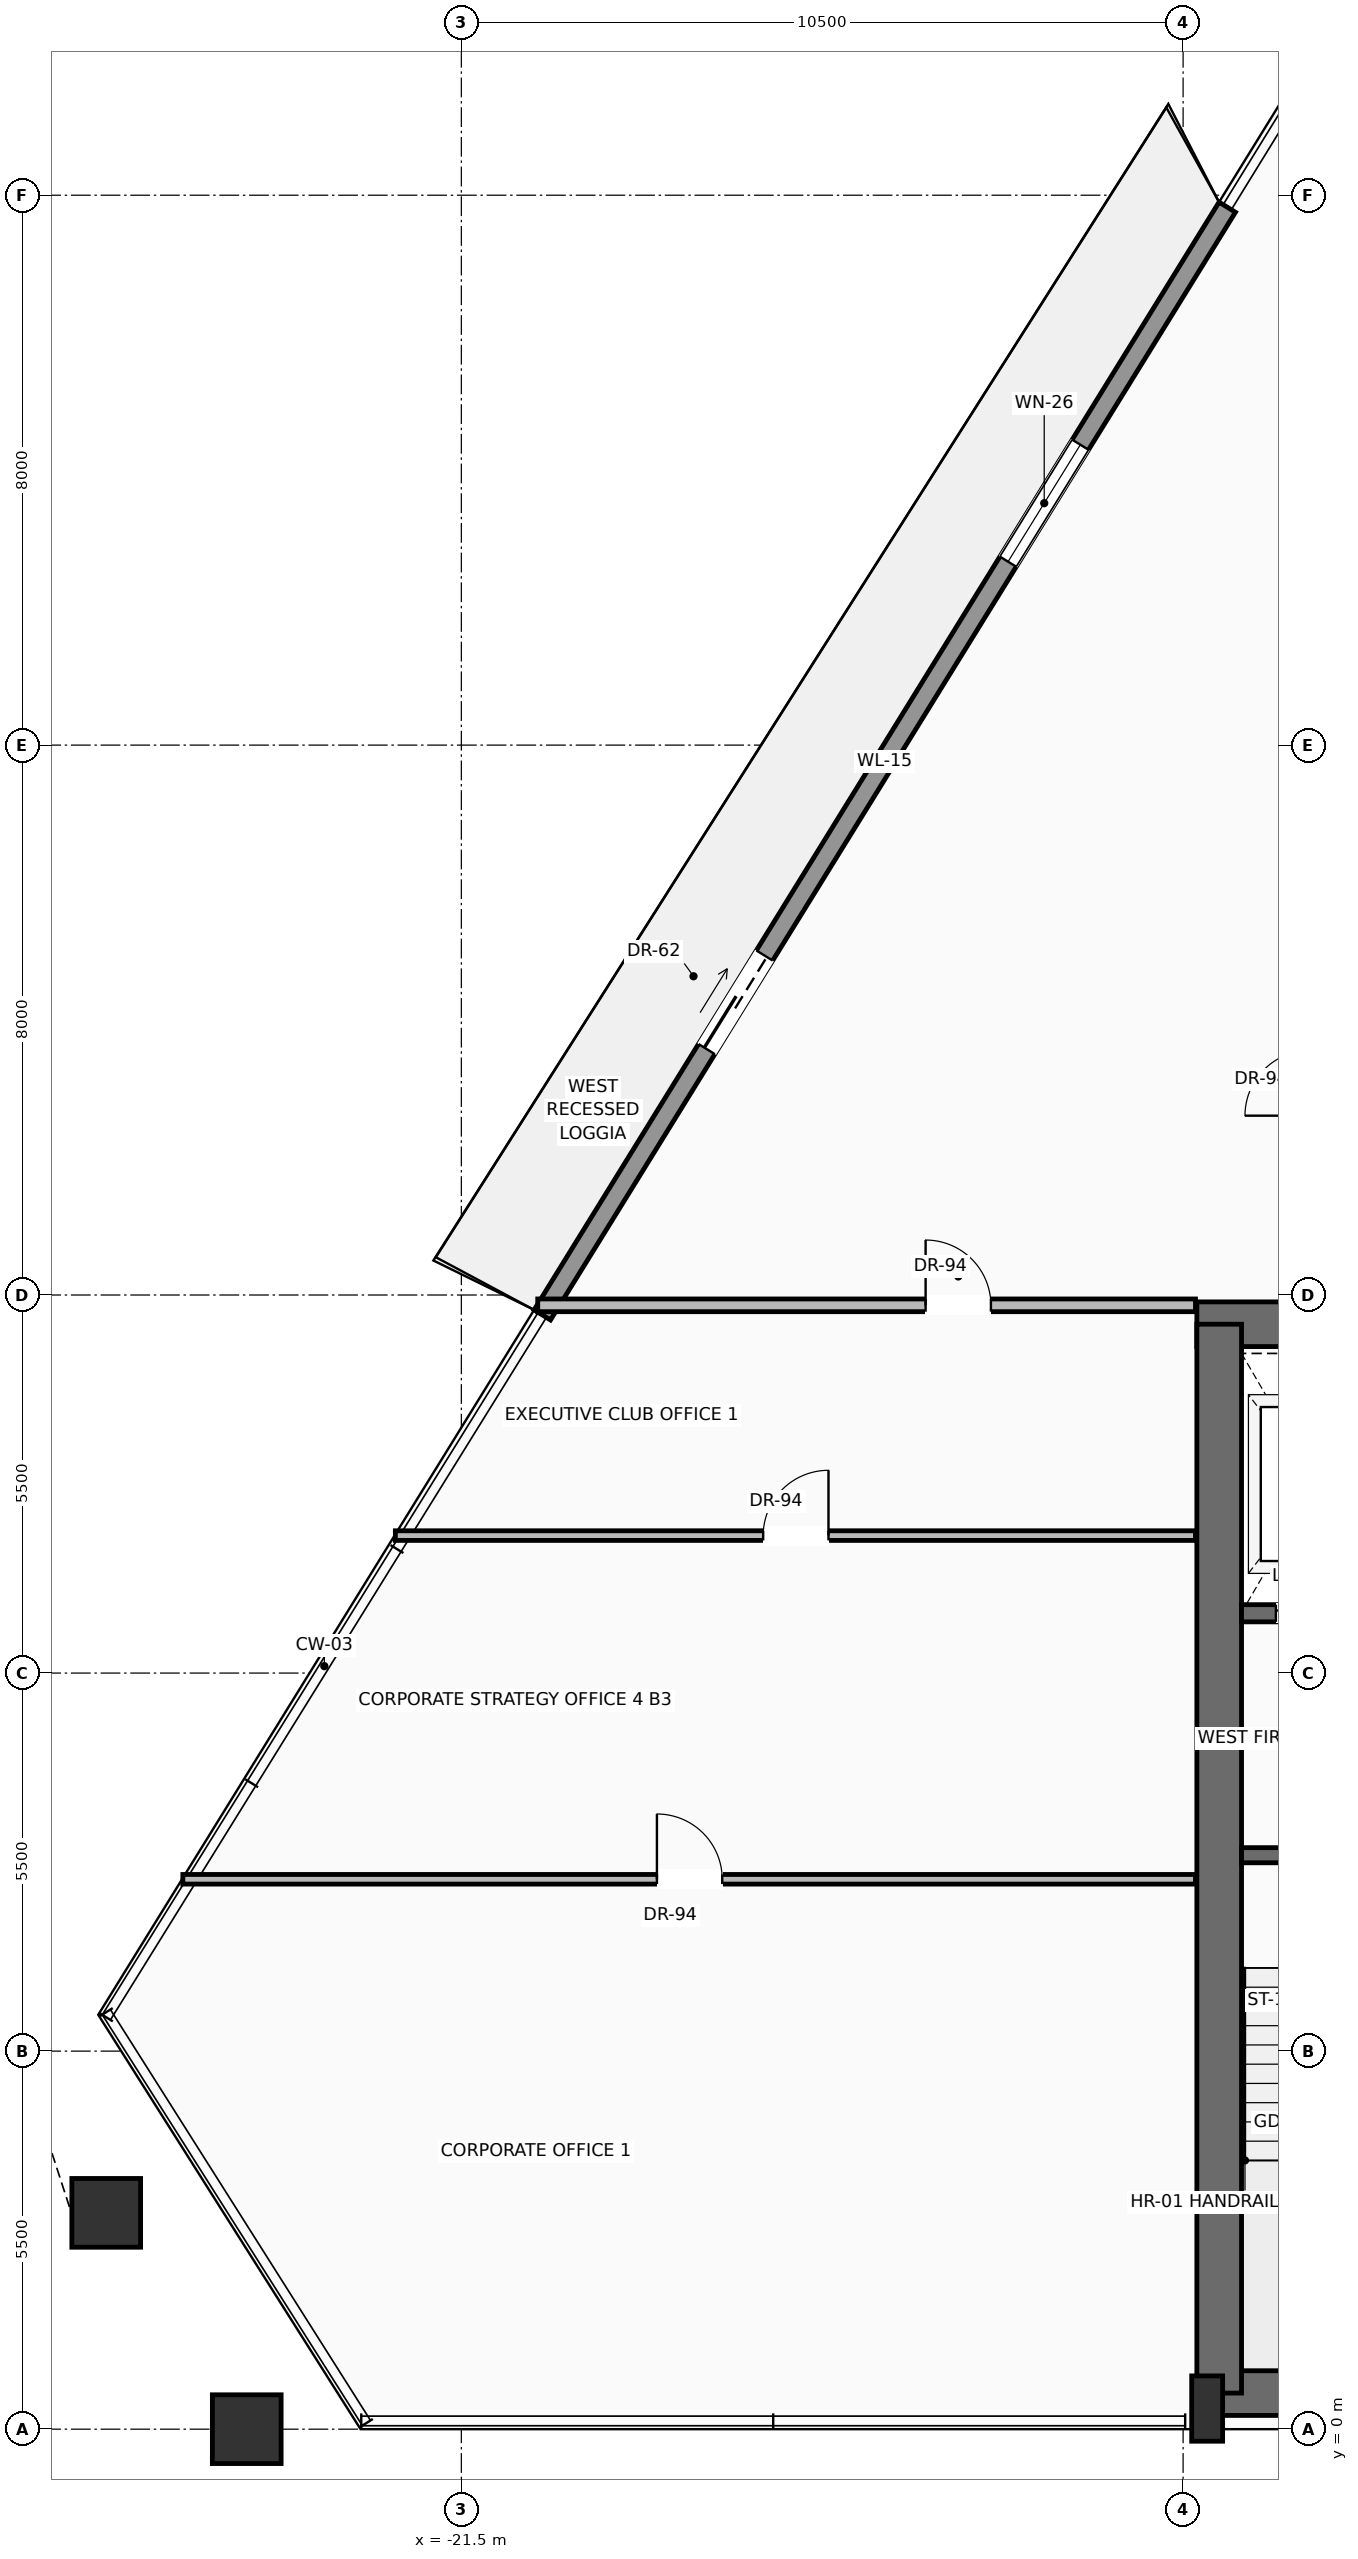
"""IFC4 building model, lengths in metres.
Left out: names, types, materials, properties, quantities, classifications, styles, units other than length and angle.
Written with IfcOpenShell. Run it as: python <this file> out.ifc"""

import sys

from ifc_helpers import new_model, si_unit, direction, frame, frame_2d, origin, origin_2d, place, context, subcontext, project, spatial, rectangle, hollow_rectangle, extrude, source, transform, mapped, element, fill, save


model = new_model("IFC4")
c1 = context("Model", 3, precision=1e-05, world=origin(), true_north=direction((0.0, 1.0)))
c2 = subcontext(c1, "Body", "Model", "MODEL_VIEW")
j1 = project(units=[si_unit("LENGTHUNIT", "METRE"), si_unit("PLANEANGLEUNIT", "RADIAN")], contexts=[c1])
p1 = place(None, origin())
s1 = spatial("IfcSite", under=j1, at=p1, CompositionType="ELEMENT")
p2 = place(p1, origin())
s2 = spatial("IfcBuilding", under=s1, at=p2, CompositionType="ELEMENT")
p3 = place(p2, frame((0.0, 0.0, 189.5)))
s3 = spatial("IfcBuildingStorey", under=s2, at=p3, CompositionType="ELEMENT", Elevation=189.5)
p4 = place(p3, frame((-10.65, 0.525, 0.0), z_axis=(0.0, 0.0, 1.0), x_axis=(1.0, 0.0, 0.0)))
e1 = element("IfcWall", 1, at=p4, inside=s3, PredefinedType="SHEAR", context=c2, shape_type="SweptSolid", body=[
    extrude(rectangle(XDim=21.3, YDim=0.65, at=frame_2d((10.65, 0.0))), origin(), (0.0, 0.0, 1.0), 3.47),
])
p5 = place(p3, frame((-10.8, 16.075, 0.0), z_axis=(0.0, 0.0, 1.0), x_axis=(1.0, 0.0, 0.0)))
e2 = element("IfcWall", 2, at=p5, inside=s3, PredefinedType="SHEAR", context=c2, shape_type="SweptSolid", body=[
    extrude(rectangle(XDim=21.6, YDim=0.65, at=frame_2d((10.8, 0.0))), origin(), (0.0, 0.0, 1.0), 3.47),
])
p6 = place(p5, frame((3.37, 0.0, 0.0)))
e3 = element("IfcOpeningElement", 3, at=p6, cuts=e2, PredefinedType="OPENING", context=c2, shape_type="SweptSolid", body=[
    extrude(rectangle(XDim=1.3, YDim=2.3, at=frame_2d((0.65, 1.15))), frame((0.0, 0.335, 0.0), z_axis=(0.0, -1.0, 0.0), x_axis=(1.0, 0.0, 0.0)), (0.0, 0.0, 1.0), 0.67),
])
p7 = place(p5, frame((9.8, 0.0, 0.0)))
e4 = element("IfcOpeningElement", 4, at=p7, cuts=e2, PredefinedType="OPENING", context=c2, shape_type="SweptSolid", body=[
    extrude(rectangle(XDim=2.0, YDim=2.4, at=frame_2d((1.0, 1.2))), frame((0.0, 0.335, 0.0), z_axis=(0.0, -1.0, 0.0), x_axis=(1.0, 0.0, 0.0)), (0.0, 0.0, 1.0), 0.67),
])
p8 = place(p3, frame((-10.475, 0.525, 0.0), z_axis=(0.0, 0.0, 1.0), x_axis=(0.0, 1.0, 0.0)))
e5 = element("IfcWall", 5, at=p8, inside=s3, PredefinedType="SHEAR", context=c2, shape_type="SweptSolid", body=[
    extrude(rectangle(XDim=15.55, YDim=0.65, at=frame_2d((7.775, 0.0))), origin(), (0.0, 0.0, 1.0), 3.47),
])
m1 = source(origin(), c2, "Body", "SweptSolid", [
    extrude(rectangle(XDim=0.45, YDim=0.95, at=origin_2d()), origin(), (0.0, 0.0, 1.0), 3.7),
])
p9 = place(p3, frame((-10.65, 0.3, 0.0), z_axis=(0.0, 0.0, 1.0), x_axis=(1.0, 0.0, 0.0)))
e6 = element("IfcColumn", 6, at=p9, inside=s3, PredefinedType="PILASTER", context=c2, shape_type="MappedRepresentation", body=[
    mapped(m1, transform((0.0, 0.0, 0.0), scale=1.0)),
])
m2 = source(origin(), c2, "Body", "SweptSolid", [
    extrude(hollow_rectangle(XDim=1.0, YDim=1.0, WallThickness=0.05, at=origin_2d()), origin(), (0.0, 0.0, 1.0), 3.691),
])
p10 = place(p3, frame((-24.622, 0.0, 0.004), z_axis=(-0.006878599086, 0.0, 0.999976342157), x_axis=(0.0, -1.0, 0.0)))
e7 = element("IfcColumn", 7, at=p10, inside=s3, PredefinedType="COLUMN", context=c2, shape_type="MappedRepresentation", body=[
    mapped(m2, transform((0.0, 0.0, 0.0), scale=1.0)),
])
m3 = source(origin(), c2, "Body", "SweptSolid", [
    extrude(hollow_rectangle(XDim=1.0, YDim=1.0, WallThickness=0.05, at=origin_2d()), origin(), (0.0, 0.0, 1.0), 3.692),
])
p11 = place(p3, frame((-26.666, 3.147, 0.004), z_axis=(0.003505085112, -0.015409147757, 0.999875128475), x_axis=(0.975091729555, 0.221801981401, 0.0)))
e8 = element("IfcColumn", 8, at=p11, inside=s3, PredefinedType="COLUMN", context=c2, shape_type="MappedRepresentation", body=[
    mapped(m3, transform((0.0, 0.0, 0.0), scale=1.0)),
])
p12 = place(p3, frame((-20.322, 16.21, 0.0), z_axis=(0.0, 0.0, 1.0), x_axis=(0.525894981058, 0.850549509963, 0.0)))
e9 = element("IfcWall", 9, at=p12, inside=s3, PredefinedType="SOLIDWALL", context=c2, shape_type="SweptSolid", body=[
    extrude(rectangle(XDim=18.948, YDim=0.28, at=frame_2d((9.474, 0.0))), origin(), (0.0, 0.0, 1.0), 3.05),
])
p13 = place(p12, frame((4.547, 0.0, 0.0)))
e10 = element("IfcOpeningElement", 10, at=p13, cuts=e9, PredefinedType="OPENING", context=c2, shape_type="SweptSolid", body=[
    extrude(rectangle(XDim=1.6, YDim=2.35, at=frame_2d((0.8, 1.175))), frame((0.0, 0.15, 0.0), z_axis=(0.0, -1.0, 0.0), x_axis=(1.0, 0.0, 0.0)), (0.0, 0.0, 1.0), 0.3),
])
p14 = place(p12, frame((12.884, 0.0, 0.9)))
e11 = element("IfcOpeningElement", 11, at=p14, cuts=e9, PredefinedType="OPENING", context=c2, shape_type="SweptSolid", body=[
    extrude(rectangle(XDim=2.0, YDim=1.85, at=frame_2d((1.0, 0.925))), frame((0.0, 0.15, 0.0), z_axis=(0.0, -1.0, 0.0), x_axis=(1.0, 0.0, 0.0)), (0.0, 0.0, 1.0), 0.3),
])
p15 = place(p3, frame((-5.5, 8.35, 0.0), z_axis=(0.0, 0.0, 1.0), x_axis=(-1.0, 0.0, 0.0)))
e12 = element("IfcWall", 12, at=p15, inside=s3, PredefinedType="SOLIDWALL", context=c2, shape_type="SweptSolid", body=[
    extrude(rectangle(XDim=4.65, YDim=0.22, at=frame_2d((2.325, 0.0))), origin(), (0.0, 0.0, 1.0), 3.47),
])
p16 = place(p15, frame((2.5, 0.0, 0.0)))
e13 = element("IfcOpeningElement", 13, at=p16, cuts=e12, PredefinedType="OPENING", context=c2, shape_type="SweptSolid", body=[
    extrude(rectangle(XDim=1.15, YDim=2.2, at=frame_2d((0.575, 1.1))), frame((0.0, 0.12, 0.0), z_axis=(0.0, -1.0, 0.0), x_axis=(1.0, 0.0, 0.0)), (0.0, 0.0, 1.0), 0.24),
])
p17 = place(p3, frame((-5.5, 11.87, 0.0), z_axis=(0.0, 0.0, 1.0), x_axis=(-1.0, 0.0, 0.0)))
e14 = element("IfcWall", 14, at=p17, inside=s3, PredefinedType="SOLIDWALL", context=c2, shape_type="SweptSolid", body=[
    extrude(rectangle(XDim=4.65, YDim=0.25, at=frame_2d((2.325, 0.0))), origin(), (0.0, 0.0, 1.0), 3.47),
])
p18 = place(p17, frame((2.95, 0.0, 0.0)))
e15 = element("IfcOpeningElement", 15, at=p18, cuts=e14, PredefinedType="OPENING", context=c2, shape_type="SweptSolid", body=[
    extrude(rectangle(XDim=1.2, YDim=2.25, at=frame_2d((0.6, 1.125))), frame((0.0, 0.135, 0.0), z_axis=(0.0, -1.0, 0.0), x_axis=(1.0, 0.0, 0.0)), (0.0, 0.0, 1.0), 0.27),
])
p19 = place(p3, frame((-20.389, 16.35, 0.0), z_axis=(0.0, 0.0, 1.0), x_axis=(1.0, 0.0, 0.0)))
e16 = element("IfcWall", 16, at=p19, inside=s3, PredefinedType="PARTITIONING", context=c2, shape_type="SweptSolid", body=[
    extrude(rectangle(XDim=9.569, YDim=0.185, at=frame_2d((4.784, 0.0))), origin(), (0.0, 0.0, 1.0), 3.462),
])
p20 = place(p19, frame((5.643, 0.0, 0.0)))
e17 = element("IfcOpeningElement", 17, at=p20, cuts=e16, PredefinedType="OPENING", context=c2, shape_type="SweptSolid", body=[
    extrude(rectangle(XDim=0.95, YDim=2.2, at=frame_2d((0.475, 1.1))), frame((0.0, 0.103, 0.0), z_axis=(0.0, -1.0, 0.0), x_axis=(1.0, 0.0, 0.0)), (0.0, 0.0, 1.0), 0.205),
])
p21 = place(p3, frame((-25.552, 8.0, 0.0), z_axis=(0.0, 0.0, 1.0), x_axis=(1.0, 0.0, 0.0)))
e18 = element("IfcWall", 18, at=p21, inside=s3, PredefinedType="PARTITIONING", context=c2, shape_type="SweptSolid", body=[
    extrude(rectangle(XDim=14.731, YDim=0.14, at=frame_2d((7.366, 0.0))), origin(), (0.0, 0.0, 1.0), 3.462),
])
p22 = place(p21, frame((6.897, 0.0, 0.0)))
e19 = element("IfcOpeningElement", 19, at=p22, cuts=e18, PredefinedType="OPENING", context=c2, shape_type="SweptSolid", body=[
    extrude(rectangle(XDim=0.95, YDim=2.2, at=frame_2d((0.475, 1.1))), frame((0.0, 0.08, 0.0), z_axis=(0.0, -1.0, 0.0), x_axis=(1.0, 0.0, 0.0)), (0.0, 0.0, 1.0), 0.16),
])
p23 = place(p3, frame((-22.46, 13.0, 0.0), z_axis=(0.0, 0.0, 1.0), x_axis=(1.0, 0.0, 0.0)))
e20 = element("IfcWall", 20, at=p23, inside=s3, PredefinedType="PARTITIONING", context=c2, shape_type="SweptSolid", body=[
    extrude(rectangle(XDim=11.64, YDim=0.14, at=frame_2d((5.82, 0.0))), origin(), (0.0, 0.0, 1.0), 3.462),
])
p24 = place(p23, frame((5.351, 0.0, 0.0)))
e21 = element("IfcOpeningElement", 21, at=p24, cuts=e20, PredefinedType="OPENING", context=c2, shape_type="SweptSolid", body=[
    extrude(rectangle(XDim=0.95, YDim=2.2, at=frame_2d((0.475, 1.1))), frame((0.0, 0.08, 0.0), z_axis=(0.0, -1.0, 0.0), x_axis=(1.0, 0.0, 0.0)), (0.0, 0.0, 1.0), 0.16),
])
m4 = source(origin(), c2, "Body", "SweptSolid", [
    extrude(rectangle(XDim=1.6, YDim=2.35, at=frame_2d((0.8, 1.175))), frame((0.0, 0.025, 0.0), z_axis=(0.0, -1.0, 0.0), x_axis=(1.0, 0.0, 0.0)), (0.0, 0.0, 1.0), 0.05),
])
p25 = place(p13, origin())
e22 = element("IfcDoor", 22, at=p25, inside=s3, OperationType="SLIDING_TO_LEFT", PredefinedType="DOOR", context=c2, shape_type="MappedRepresentation", body=[
    mapped(m4, transform((0.0, 0.0, 0.0), scale=1.0)),
])
fill(e10, e22)
m5 = source(origin(), c2, "Body", "SweptSolid", [
    extrude(rectangle(XDim=2.0, YDim=1.85, at=frame_2d((1.0, 0.925))), frame((0.0, 0.03, 0.0), z_axis=(0.0, -1.0, 0.0), x_axis=(1.0, 0.0, 0.0)), (0.0, 0.0, 1.0), 0.06),
])
p26 = place(p14, origin())
e23 = element("IfcWindow", 23, at=p26, inside=s3, PartitioningType="SINGLE_PANEL", PredefinedType="WINDOW", context=c2, shape_type="MappedRepresentation", body=[
    mapped(m5, transform((0.0, 0.0, 0.0), scale=1.0)),
])
fill(e11, e23)
m6 = source(origin(), c2, "Body", "SweptSolid", [
    extrude(rectangle(XDim=1.2, YDim=2.25, at=frame_2d((0.6, 1.125))), frame((0.0, 0.025, 0.0), z_axis=(0.0, -1.0, 0.0), x_axis=(1.0, 0.0, 0.0)), (0.0, 0.0, 1.0), 0.05),
])
p27 = place(p18, origin())
e24 = element("IfcDoor", 24, at=p27, inside=s3, OperationType="SLIDING_TO_LEFT", PredefinedType="DOOR", context=c2, shape_type="MappedRepresentation", body=[
    mapped(m6, transform((0.0, 0.0, 0.0), scale=1.0)),
])
fill(e15, e24)
m7 = source(origin(), c2, "Body", "SweptSolid", [
    extrude(rectangle(XDim=0.95, YDim=2.2, at=frame_2d((0.475, 1.1))), frame((0.0, 0.025, 0.0), z_axis=(0.0, -1.0, 0.0), x_axis=(1.0, 0.0, 0.0)), (0.0, 0.0, 1.0), 0.05),
])
p28 = place(p20, origin())
e25 = element("IfcDoor", 25, at=p28, inside=s3, OperationType="SINGLE_SWING_LEFT", PredefinedType="DOOR", context=c2, shape_type="MappedRepresentation", body=[
    mapped(m7, transform((0.0, 0.0, 0.0), scale=1.0)),
])
fill(e17, e25)
p29 = place(p24, origin())
e26 = element("IfcDoor", 26, at=p29, inside=s3, OperationType="SINGLE_SWING_RIGHT", PredefinedType="DOOR", context=c2, shape_type="MappedRepresentation", body=[
    mapped(m7, transform((0.0, 0.0, 0.0), scale=1.0)),
])
fill(e21, e26)
p30 = place(p22, origin())
e27 = element("IfcDoor", 27, at=p30, inside=s3, OperationType="SINGLE_SWING_LEFT", PredefinedType="DOOR", context=c2, shape_type="MappedRepresentation", body=[
    mapped(m7, transform((0.0, 0.0, 0.0), scale=1.0)),
])
fill(e19, e27)
save(model, sys.argv[1])
